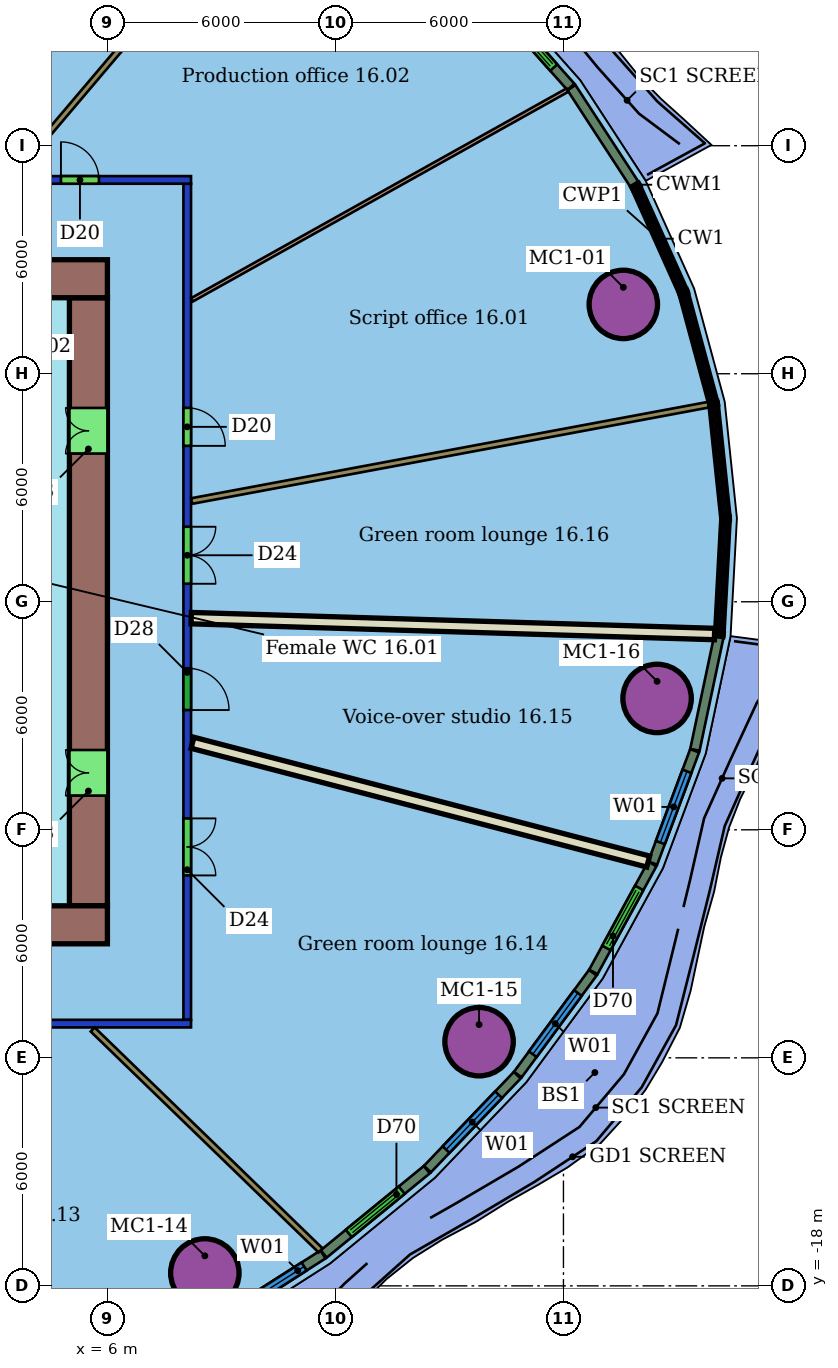
"""IFC4 building model, lengths in metres.
Left out: names, types, materials, properties, quantities, classifications, styles, units other than length and angle.
Written with IfcOpenShell. Run it as: python <this file> out.ifc"""

import sys

from ifc_helpers import new_model, si_unit, direction, frame, frame_2d, origin, origin_2d, place, context, subcontext, project, spatial, rectangle, hollow_circle, extrude, element, fill, save


model = new_model("IFC4")
c1 = context("Model", 3, precision=1e-05, world=origin(), true_north=direction((0.0, 1.0)))
c2 = subcontext(c1, "Body", "Model", "MODEL_VIEW")
j1 = project(units=[si_unit("LENGTHUNIT", "METRE"), si_unit("PLANEANGLEUNIT", "RADIAN")], contexts=[c1])
p1 = place(None, origin())
s1 = spatial("IfcSite", under=j1, at=p1, CompositionType="ELEMENT")
p2 = place(p1, origin())
s2 = spatial("IfcBuilding", under=s1, at=p2, CompositionType="ELEMENT")
p3 = place(p2, frame((0.0, 0.0, 76.7)))
s3 = spatial("IfcBuildingStorey", under=s2, at=p3, CompositionType="ELEMENT", Elevation=76.7)
for number, where, z_axis, x_axis in (
    (1, (19.575, 7.824, 0.0), (0.0, 0.0, 1.0), (1.0, 0.0, 0.0)),
    (2, (8.563, -17.66, 0.0), (0.0, 0.0, 1.0), (1.0, 0.0, 0.0)),
    (3, (15.78, -11.576, 0.0), (0.0, 0.0, 1.0), (1.0, 0.0, 0.0)),
    (4, (20.464, -2.543, 0.0), (0.0, 0.0, 1.0), (1.0, 0.0, 0.0)),
):
    element("IfcColumn", number, at=place(p3, frame(where, z_axis=z_axis, x_axis=x_axis)), inside=s3, PredefinedType="COLUMN", context=c2, shape_type="SweptSolid", body=[
        extrude(hollow_circle(Radius=0.9, WallThickness=0.06, at=origin_2d()), origin(), (0.0, 0.0, 1.0), 3.55),
    ])
p4 = place(p3, frame((8.2, -11.1, 0.0), z_axis=(0.0, 0.0, 1.0), x_axis=(-1.0, 0.0, 0.0)))
e5 = element("IfcWall", 5, at=p4, inside=s3, PredefinedType="PARTITIONING", context=c2, shape_type="SweptSolid", body=[
    extrude(rectangle(XDim=28.4, YDim=0.2, at=frame_2d((14.2, 0.0))), origin(), (0.0, 0.0, 1.0), 2.85),
])
p5 = place(p4, frame((24.977, 0.0, 0.0)))
e6 = element("IfcOpeningElement", 6, at=p5, cuts=e5, PredefinedType="OPENING", context=c2, shape_type="SweptSolid", body=[
    extrude(rectangle(XDim=1.1, YDim=2.1, at=frame_2d((0.55, 1.05))), frame((0.0, 0.11, 0.0), z_axis=(0.0, -1.0, 0.0), x_axis=(1.0, 0.0, 0.0)), (0.0, 0.0, 1.0), 0.22),
])
p6 = place(p4, frame((19.256, 0.0, 0.0)))
e7 = element("IfcOpeningElement", 7, at=p6, cuts=e5, PredefinedType="OPENING", context=c2, shape_type="SweptSolid", body=[
    extrude(rectangle(XDim=1.0, YDim=2.1, at=frame_2d((0.5, 1.05))), frame((0.0, 0.11, 0.0), z_axis=(0.0, -1.0, 0.0), x_axis=(1.0, 0.0, 0.0)), (0.0, 0.0, 1.0), 0.22),
])
p7 = place(p4, frame((15.081, 0.0, 0.0)))
e8 = element("IfcOpeningElement", 8, at=p7, cuts=e5, PredefinedType="OPENING", context=c2, shape_type="SweptSolid", body=[
    extrude(rectangle(XDim=0.9, YDim=2.1, at=frame_2d((0.45, 1.05))), frame((0.0, 0.11, 0.0), z_axis=(0.0, -1.0, 0.0), x_axis=(1.0, 0.0, 0.0)), (0.0, 0.0, 1.0), 0.22),
])
p8 = place(p4, frame((8.472, 0.0, 0.0)))
e9 = element("IfcOpeningElement", 9, at=p8, cuts=e5, PredefinedType="OPENING", context=c2, shape_type="SweptSolid", body=[
    extrude(rectangle(XDim=0.9, YDim=2.1, at=frame_2d((0.45, 1.05))), frame((0.0, 0.11, 0.0), z_axis=(0.0, -1.0, 0.0), x_axis=(1.0, 0.0, 0.0)), (0.0, 0.0, 1.0), 0.22),
])
p9 = place(p3, frame((-20.2, 11.1, 0.0), z_axis=(0.0, 0.0, 1.0), x_axis=(1.0, 0.0, 0.0)))
e10 = element("IfcWall", 10, at=p9, inside=s3, PredefinedType="PARTITIONING", context=c2, shape_type="SweptSolid", body=[
    extrude(rectangle(XDim=28.4, YDim=0.2, at=frame_2d((14.2, 0.0))), origin(), (0.0, 0.0, 1.0), 2.85),
])
p10 = place(p9, frame((24.977, 0.0, 0.0)))
e11 = element("IfcOpeningElement", 11, at=p10, cuts=e10, PredefinedType="OPENING", context=c2, shape_type="SweptSolid", body=[
    extrude(rectangle(XDim=1.0, YDim=2.1, at=frame_2d((0.5, 1.05))), frame((0.0, 0.11, 0.0), z_axis=(0.0, -1.0, 0.0), x_axis=(1.0, 0.0, 0.0)), (0.0, 0.0, 1.0), 0.22),
])
p11 = place(p9, frame((19.076, 0.0, 0.0)))
e12 = element("IfcOpeningElement", 12, at=p11, cuts=e10, PredefinedType="OPENING", context=c2, shape_type="SweptSolid", body=[
    extrude(rectangle(XDim=1.5, YDim=2.1, at=frame_2d((0.75, 1.05))), frame((0.0, 0.11, 0.0), z_axis=(0.0, -1.0, 0.0), x_axis=(1.0, 0.0, 0.0)), (0.0, 0.0, 1.0), 0.22),
])
p12 = place(p9, frame((15.051, 0.0, 0.0)))
e13 = element("IfcOpeningElement", 13, at=p12, cuts=e10, PredefinedType="OPENING", context=c2, shape_type="SweptSolid", body=[
    extrude(rectangle(XDim=0.9, YDim=2.1, at=frame_2d((0.45, 1.05))), frame((0.0, 0.11, 0.0), z_axis=(0.0, -1.0, 0.0), x_axis=(1.0, 0.0, 0.0)), (0.0, 0.0, 1.0), 0.22),
])
p13 = place(p9, frame((8.231, 0.0, 0.0)))
e14 = element("IfcOpeningElement", 14, at=p13, cuts=e10, PredefinedType="OPENING", context=c2, shape_type="SweptSolid", body=[
    extrude(rectangle(XDim=1.2, YDim=2.1, at=frame_2d((0.6, 1.05))), frame((0.0, 0.11, 0.0), z_axis=(0.0, -1.0, 0.0), x_axis=(1.0, 0.0, 0.0)), (0.0, 0.0, 1.0), 0.22),
])
p14 = place(p3, frame((8.1, 11.0, 0.0), z_axis=(0.0, 0.0, 1.0), x_axis=(0.0, -1.0, 0.0)))
e15 = element("IfcWall", 15, at=p14, inside=s3, PredefinedType="PARTITIONING", context=c2, shape_type="SweptSolid", body=[
    extrude(rectangle(XDim=22.0, YDim=0.2, at=frame_2d((11.0, 0.0))), origin(), (0.0, 0.0, 1.0), 2.85),
])
p15 = place(p14, frame((5.898, 0.0, 0.0)))
e16 = element("IfcOpeningElement", 16, at=p15, cuts=e15, PredefinedType="OPENING", context=c2, shape_type="SweptSolid", body=[
    extrude(rectangle(XDim=1.0, YDim=2.1, at=frame_2d((0.5, 1.05))), frame((0.0, 0.11, 0.0), z_axis=(0.0, -1.0, 0.0), x_axis=(1.0, 0.0, 0.0)), (0.0, 0.0, 1.0), 0.22),
])
p16 = place(p14, frame((16.7, 0.0, 0.0)))
e17 = element("IfcOpeningElement", 17, at=p16, cuts=e15, PredefinedType="OPENING", context=c2, shape_type="SweptSolid", body=[
    extrude(rectangle(XDim=1.5, YDim=2.1, at=frame_2d((0.75, 1.05))), frame((0.0, 0.11, 0.0), z_axis=(0.0, -1.0, 0.0), x_axis=(1.0, 0.0, 0.0)), (0.0, 0.0, 1.0), 0.22),
])
p17 = place(p14, frame((12.749, 0.0, 0.0)))
e18 = element("IfcOpeningElement", 18, at=p17, cuts=e15, PredefinedType="OPENING", context=c2, shape_type="SweptSolid", body=[
    extrude(rectangle(XDim=1.1, YDim=2.1, at=frame_2d((0.55, 1.05))), frame((0.0, 0.11, 0.0), z_axis=(0.0, -1.0, 0.0), x_axis=(1.0, 0.0, 0.0)), (0.0, 0.0, 1.0), 0.22),
])
p18 = place(p14, frame((9.026, 0.0, 0.0)))
e19 = element("IfcOpeningElement", 19, at=p18, cuts=e15, PredefinedType="OPENING", context=c2, shape_type="SweptSolid", body=[
    extrude(rectangle(XDim=1.5, YDim=2.1, at=frame_2d((0.75, 1.05))), frame((0.0, 0.11, 0.0), z_axis=(0.0, -1.0, 0.0), x_axis=(1.0, 0.0, 0.0)), (0.0, 0.0, 1.0), 0.22),
])
p19 = place(p3, frame((21.825, 5.187, 0.0), z_axis=(0.0, 0.0, 1.0), x_axis=(-0.983062883459, -0.183268565676, 0.0)))
e20 = element("IfcWall", 20, at=p19, inside=s3, PredefinedType="PARTITIONING", context=c2, shape_type="SweptSolid", body=[
    extrude(rectangle(XDim=13.846, YDim=0.15, at=frame_2d((6.923, 0.0))), origin(), (0.0, 0.0, 1.0), 3.55),
])
p20 = place(p3, frame((18.104, 13.463, 0.0), z_axis=(0.0, 0.0, 1.0), x_axis=(-0.873053971866, -0.4876235866, 0.0)))
e21 = element("IfcWall", 21, at=p20, inside=s3, PredefinedType="PARTITIONING", context=c2, shape_type="SweptSolid", body=[
    extrude(rectangle(XDim=11.317, YDim=0.1, at=frame_2d((5.658, 0.0))), origin(), (0.0, 0.0, 1.0), 3.55),
])
p21 = place(p3, frame((10.716, 19.716, 0.0), z_axis=(0.0, 0.0, 1.0), x_axis=(-0.646692205785, -0.762751067503, 0.0)))
e22 = element("IfcWall", 22, at=p21, inside=s3, PredefinedType="PARTITIONING", context=c2, shape_type="SweptSolid", body=[
    extrude(rectangle(XDim=11.101, YDim=0.15, at=frame_2d((5.55, 0.0))), origin(), (0.0, 0.0, 1.0), 3.55),
])
p22 = place(p3, frame((11.609, -17.066, 0.0), z_axis=(0.0, 0.0, 1.0), x_axis=(-0.71809914042, 0.695940819702, 0.0)))
e23 = element("IfcWall", 23, at=p22, inside=s3, PredefinedType="PARTITIONING", context=c2, shape_type="SweptSolid", body=[
    extrude(rectangle(XDim=8.352, YDim=0.15, at=frame_2d((4.176, 0.0))), origin(), (0.0, 0.0, 1.0), 3.55),
])
p23 = place(p3, frame((20.23, -6.835, 0.0), z_axis=(0.0, 0.0, 1.0), x_axis=(-0.967685437555, 0.252160452774, 0.0)))
e24 = element("IfcWall", 24, at=p23, inside=s3, PredefinedType="PARTITIONING", context=c2, shape_type="SweptSolid", body=[
    extrude(rectangle(XDim=12.393, YDim=0.3, at=frame_2d((6.196, 0.0))), origin(), (0.0, 0.0, 1.0), 3.55),
])
p24 = place(p3, frame((21.976, -0.848, 0.0), z_axis=(0.0, 0.0, 1.0), x_axis=(-0.999540837696, 0.030300392357, 0.0)))
e25 = element("IfcWall", 25, at=p24, inside=s3, PredefinedType="PARTITIONING", context=c2, shape_type="SweptSolid", body=[
    extrude(rectangle(XDim=13.778, YDim=0.3, at=frame_2d((6.889, 0.0))), origin(), (0.0, 0.0, 1.0), 3.55),
])
p25 = place(p3, frame((19.871, 10.978, 0.0), z_axis=(0.0, 0.0, 1.0), x_axis=(-0.545574882471, 0.838062078618, 0.0)))
e26 = element("IfcWall", 26, at=p25, inside=s3, PredefinedType="SOLIDWALL", context=c2, shape_type="SweptSolid", body=[
    extrude(rectangle(XDim=3.042, YDim=0.25, at=frame_2d((1.521, 0.0))), origin(), (0.0, 0.0, 1.0), 3.15),
])
p26 = place(p3, frame((18.195, 13.549, 0.0), z_axis=(0.0, 0.0, 1.0), x_axis=(-0.663940867432, 0.747785079119, 0.0)))
e27 = element("IfcWall", 27, at=p26, inside=s3, PredefinedType="SOLIDWALL", context=c2, shape_type="SweptSolid", body=[
    extrude(rectangle(XDim=3.154, YDim=0.25, at=frame_2d((1.577, 0.0))), origin(), (0.0, 0.0, 1.0), 3.15),
])
p27 = place(p26, frame((0.677, 0.0, 0.0)))
e28 = element("IfcOpeningElement", 28, at=p27, cuts=e27, PredefinedType="OPENING", context=c2, shape_type="SweptSolid", body=[
    extrude(rectangle(XDim=1.8, YDim=2.4, at=frame_2d((0.9, 1.2))), frame((0.0, 0.135, 0.0), z_axis=(0.0, -1.0, 0.0), x_axis=(1.0, 0.0, 0.0)), (0.0, 0.0, 1.0), 0.27),
])
p28 = place(p3, frame((8.657, -19.1, 0.0), z_axis=(0.0, 0.0, 1.0), x_axis=(0.842814889598, 0.538203550594, 0.0)))
e29 = element("IfcWall", 29, at=p28, inside=s3, PredefinedType="SOLIDWALL", context=c2, shape_type="SweptSolid", body=[
    extrude(rectangle(XDim=3.579, YDim=0.25, at=frame_2d((1.789, 0.0))), origin(), (0.0, 0.0, 1.0), 3.15),
])
p29 = place(p28, frame((0.989, 0.0, 0.8)))
e30 = element("IfcOpeningElement", 30, at=p29, cuts=e29, PredefinedType="OPENING", context=c2, shape_type="SweptSolid", body=[
    extrude(rectangle(XDim=2.0, YDim=2.2, at=frame_2d((1.0, 1.1))), frame((0.0, 0.135, 0.0), z_axis=(0.0, -1.0, 0.0), x_axis=(1.0, 0.0, 0.0)), (0.0, 0.0, 1.0), 0.27),
])
p30 = place(p3, frame((11.691, -17.16, 0.0), z_axis=(0.0, 0.0, 1.0), x_axis=(0.774224225452, 0.632911406694, 0.0)))
e31 = element("IfcWall", 31, at=p30, inside=s3, PredefinedType="SOLIDWALL", context=c2, shape_type="SweptSolid", body=[
    extrude(rectangle(XDim=3.504, YDim=0.25, at=frame_2d((1.752, 0.0))), origin(), (0.0, 0.0, 1.0), 3.15),
])
p31 = place(p30, frame((0.852, 0.0, 0.0)))
e32 = element("IfcOpeningElement", 32, at=p31, cuts=e31, PredefinedType="OPENING", context=c2, shape_type="SweptSolid", body=[
    extrude(rectangle(XDim=1.8, YDim=2.4, at=frame_2d((0.9, 1.2))), frame((0.0, 0.135, 0.0), z_axis=(0.0, -1.0, 0.0), x_axis=(1.0, 0.0, 0.0)), (0.0, 0.0, 1.0), 0.27),
])
p32 = place(p3, frame((14.421, -14.927, 0.0), z_axis=(0.0, 0.0, 1.0), x_axis=(0.691365335557, 0.722505344472, 0.0)))
e33 = element("IfcWall", 33, at=p32, inside=s3, PredefinedType="SOLIDWALL", context=c2, shape_type="SweptSolid", body=[
    extrude(rectangle(XDim=3.418, YDim=0.25, at=frame_2d((1.709, 0.0))), origin(), (0.0, 0.0, 1.0), 3.15),
])
p33 = place(p32, frame((0.709, 0.0, 0.8)))
e34 = element("IfcOpeningElement", 34, at=p33, cuts=e33, PredefinedType="OPENING", context=c2, shape_type="SweptSolid", body=[
    extrude(rectangle(XDim=2.0, YDim=2.2, at=frame_2d((1.0, 1.1))), frame((0.0, 0.135, 0.0), z_axis=(0.0, -1.0, 0.0), x_axis=(1.0, 0.0, 0.0)), (0.0, 0.0, 1.0), 0.27),
])
p34 = place(p3, frame((16.8, -12.439, 0.0), z_axis=(0.0, 0.0, 1.0), x_axis=(0.593169002349, 0.805077968058, 0.0)))
e35 = element("IfcWall", 35, at=p34, inside=s3, PredefinedType="SOLIDWALL", context=c2, shape_type="SweptSolid", body=[
    extrude(rectangle(XDim=3.327, YDim=0.25, at=frame_2d((1.664, 0.0))), origin(), (0.0, 0.0, 1.0), 3.15),
])
p35 = place(p34, frame((0.664, 0.0, 0.8)))
e36 = element("IfcOpeningElement", 36, at=p35, cuts=e35, PredefinedType="OPENING", context=c2, shape_type="SweptSolid", body=[
    extrude(rectangle(XDim=2.0, YDim=2.2, at=frame_2d((1.0, 1.1))), frame((0.0, 0.135, 0.0), z_axis=(0.0, -1.0, 0.0), x_axis=(1.0, 0.0, 0.0)), (0.0, 0.0, 1.0), 0.27),
])
p36 = place(p3, frame((18.787, -9.74, 0.0), z_axis=(0.0, 0.0, 1.0), x_axis=(0.479174455818, 0.877719682411, 0.0)))
e37 = element("IfcWall", 37, at=p36, inside=s3, PredefinedType="SOLIDWALL", context=c2, shape_type="SweptSolid", body=[
    extrude(rectangle(XDim=3.237, YDim=0.25, at=frame_2d((1.618, 0.0))), origin(), (0.0, 0.0, 1.0), 3.15),
])
p37 = place(p36, frame((0.718, 0.0, 0.0)))
e38 = element("IfcOpeningElement", 38, at=p37, cuts=e37, PredefinedType="OPENING", context=c2, shape_type="SweptSolid", body=[
    extrude(rectangle(XDim=1.8, YDim=2.4, at=frame_2d((0.9, 1.2))), frame((0.0, 0.135, 0.0), z_axis=(0.0, -1.0, 0.0), x_axis=(1.0, 0.0, 0.0)), (0.0, 0.0, 1.0), 0.27),
])
p38 = place(p3, frame((20.348, -6.875, 0.0), z_axis=(0.0, 0.0, 1.0), x_axis=(0.349935355695, 0.936773850422, 0.0)))
e39 = element("IfcWall", 39, at=p38, inside=s3, PredefinedType="SOLIDWALL", context=c2, shape_type="SweptSolid", body=[
    extrude(rectangle(XDim=3.154, YDim=0.25, at=frame_2d((1.577, 0.0))), origin(), (0.0, 0.0, 1.0), 3.15),
])
p39 = place(p38, frame((0.577, 0.0, 0.8)))
e40 = element("IfcOpeningElement", 40, at=p39, cuts=e39, PredefinedType="OPENING", context=c2, shape_type="SweptSolid", body=[
    extrude(rectangle(XDim=2.0, YDim=2.2, at=frame_2d((1.0, 1.1))), frame((0.0, 0.135, 0.0), z_axis=(0.0, -1.0, 0.0), x_axis=(1.0, 0.0, 0.0)), (0.0, 0.0, 1.0), 0.27),
])
p40 = place(p3, frame((21.459, -3.895, 0.0), z_axis=(0.0, 0.0, 1.0), x_axis=(0.206952682713, 0.97835095294, 0.0)))
e41 = element("IfcWall", 41, at=p40, inside=s3, PredefinedType="SOLIDWALL", context=c2, shape_type="SweptSolid", body=[
    extrude(rectangle(XDim=3.042, YDim=0.25, at=frame_2d((1.521, 0.0))), origin(), (0.0, 0.0, 1.0), 3.15),
])
p41 = place(p3, frame((6.0, 8.5, 0.0), z_axis=(0.0, 0.0, 1.0), x_axis=(-1.0, 0.0, 0.0)))
e42 = element("IfcWall", 42, at=p41, inside=s3, PredefinedType="SHEAR", context=c2, shape_type="SweptSolid", body=[
    extrude(rectangle(XDim=12.0, YDim=1.0, at=frame_2d((6.0, 0.0))), origin(), (0.0, 0.0, 1.0), 3.4),
])
p42 = place(p41, frame((5.6, 0.0, 0.0)))
e43 = element("IfcOpeningElement", 43, at=p42, cuts=e42, PredefinedType="OPENING", context=c2, shape_type="SweptSolid", body=[
    extrude(rectangle(XDim=1.2, YDim=2.1, at=frame_2d((0.6, 1.05))), frame((0.0, 0.51, 0.0), z_axis=(0.0, -1.0, 0.0), x_axis=(1.0, 0.0, 0.0)), (0.0, 0.0, 1.0), 1.02),
])
p43 = place(p3, frame((-18.0, -8.5, 0.0), z_axis=(0.0, 0.0, 1.0), x_axis=(1.0, 0.0, 0.0)))
e44 = element("IfcWall", 44, at=p43, inside=s3, PredefinedType="SHEAR", context=c2, shape_type="SweptSolid", body=[
    extrude(rectangle(XDim=24.0, YDim=1.0, at=frame_2d((12.0, 0.0))), origin(), (0.0, 0.0, 1.0), 3.4),
])
p44 = place(p43, frame((6.0, 0.0, 0.0)))
e45 = element("IfcOpeningElement", 45, at=p44, cuts=e44, PredefinedType="OPENING", context=c2, shape_type="SweptSolid", body=[
    extrude(rectangle(XDim=1.2, YDim=2.1, at=frame_2d((0.6, 1.05))), frame((0.0, 0.51, 0.0), z_axis=(0.0, -1.0, 0.0), x_axis=(1.0, 0.0, 0.0)), (0.0, 0.0, 1.0), 1.02),
])
p45 = place(p3, frame((5.5, -8.0, 0.0), z_axis=(0.0, 0.0, 1.0), x_axis=(0.0, 1.0, 0.0)))
e46 = element("IfcWall", 46, at=p45, inside=s3, PredefinedType="SHEAR", context=c2, shape_type="SweptSolid", body=[
    extrude(rectangle(XDim=16.0, YDim=1.0, at=frame_2d((8.0, 0.0))), origin(), (0.0, 0.0, 1.0), 3.4),
])
p46 = place(p45, frame((2.9, 0.0, 0.0)))
e47 = element("IfcOpeningElement", 47, at=p46, cuts=e46, PredefinedType="OPENING", context=c2, shape_type="SweptSolid", body=[
    extrude(rectangle(XDim=1.2, YDim=2.1, at=frame_2d((0.6, 1.05))), frame((0.0, 0.51, 0.0), z_axis=(0.0, -1.0, 0.0), x_axis=(1.0, 0.0, 0.0)), (0.0, 0.0, 1.0), 1.02),
])
p47 = place(p45, frame((11.9, 0.0, 0.0)))
e48 = element("IfcOpeningElement", 48, at=p47, cuts=e46, PredefinedType="OPENING", context=c2, shape_type="SweptSolid", body=[
    extrude(rectangle(XDim=1.2, YDim=2.1, at=frame_2d((0.6, 1.05))), frame((0.0, 0.51, 0.0), z_axis=(0.0, -1.0, 0.0), x_axis=(1.0, 0.0, 0.0)), (0.0, 0.0, 1.0), 1.02),
])
p48 = place(p15, origin())
e49 = element("IfcDoor", 49, at=p48, inside=s3, OperationType="SINGLE_SWING_RIGHT", PredefinedType="DOOR", context=c2, shape_type="SweptSolid", body=[
    extrude(rectangle(XDim=1.0, YDim=2.1, at=frame_2d((0.5, 1.05))), frame((0.0, 0.025, 0.0), z_axis=(0.0, -1.0, 0.0), x_axis=(1.0, 0.0, 0.0)), (0.0, 0.0, 1.0), 0.05),
])
fill(e16, e49)
p49 = place(p10, origin())
e50 = element("IfcDoor", 50, at=p49, inside=s3, OperationType="SINGLE_SWING_LEFT", PredefinedType="DOOR", context=c2, shape_type="SweptSolid", body=[
    extrude(rectangle(XDim=1.0, YDim=2.1, at=frame_2d((0.5, 1.05))), frame((0.0, 0.025, 0.0), z_axis=(0.0, -1.0, 0.0), x_axis=(1.0, 0.0, 0.0)), (0.0, 0.0, 1.0), 0.05),
])
fill(e11, e50)
p50 = place(p16, origin())
e51 = element("IfcDoor", 51, at=p50, inside=s3, OperationType="DOUBLE_DOOR_SINGLE_SWING", PredefinedType="DOOR", context=c2, shape_type="SweptSolid", body=[
    extrude(rectangle(XDim=1.5, YDim=2.1, at=frame_2d((0.75, 1.05))), frame((0.0, 0.025, 0.0), z_axis=(0.0, -1.0, 0.0), x_axis=(1.0, 0.0, 0.0)), (0.0, 0.0, 1.0), 0.05),
])
fill(e17, e51)
p51 = place(p17, origin())
e52 = element("IfcDoor", 52, at=p51, inside=s3, OperationType="SINGLE_SWING_RIGHT", PredefinedType="DOOR", context=c2, shape_type="SweptSolid", body=[
    extrude(rectangle(XDim=1.1, YDim=2.1, at=frame_2d((0.55, 1.05))), frame((0.0, 0.025, 0.0), z_axis=(0.0, -1.0, 0.0), x_axis=(1.0, 0.0, 0.0)), (0.0, 0.0, 1.0), 0.05),
])
fill(e18, e52)
p52 = place(p18, origin())
e53 = element("IfcDoor", 53, at=p52, inside=s3, OperationType="DOUBLE_DOOR_SINGLE_SWING", PredefinedType="DOOR", context=c2, shape_type="SweptSolid", body=[
    extrude(rectangle(XDim=1.5, YDim=2.1, at=frame_2d((0.75, 1.05))), frame((0.0, 0.025, 0.0), z_axis=(0.0, -1.0, 0.0), x_axis=(1.0, 0.0, 0.0)), (0.0, 0.0, 1.0), 0.05),
])
fill(e19, e53)
p53 = place(p27, origin())
e54 = element("IfcDoor", 54, at=p53, inside=s3, OperationType="DOUBLE_DOOR_SLIDING", PredefinedType="DOOR", context=c2, shape_type="SweptSolid", body=[
    extrude(rectangle(XDim=1.8, YDim=2.4, at=frame_2d((0.9, 1.2))), frame((0.0, 0.025, 0.0), z_axis=(0.0, -1.0, 0.0), x_axis=(1.0, 0.0, 0.0)), (0.0, 0.0, 1.0), 0.05),
])
fill(e28, e54)
p54 = place(p29, origin())
e55 = element("IfcWindow", 55, at=p54, inside=s3, PartitioningType="SINGLE_PANEL", PredefinedType="WINDOW", context=c2, shape_type="SweptSolid", body=[
    extrude(rectangle(XDim=2.0, YDim=2.2, at=frame_2d((1.0, 1.1))), frame((0.0, 0.03, 0.0), z_axis=(0.0, -1.0, 0.0), x_axis=(1.0, 0.0, 0.0)), (0.0, 0.0, 1.0), 0.06),
])
fill(e30, e55)
p55 = place(p31, origin())
e56 = element("IfcDoor", 56, at=p55, inside=s3, OperationType="DOUBLE_DOOR_SLIDING", PredefinedType="DOOR", context=c2, shape_type="SweptSolid", body=[
    extrude(rectangle(XDim=1.8, YDim=2.4, at=frame_2d((0.9, 1.2))), frame((0.0, 0.025, 0.0), z_axis=(0.0, -1.0, 0.0), x_axis=(1.0, 0.0, 0.0)), (0.0, 0.0, 1.0), 0.05),
])
fill(e32, e56)
p56 = place(p33, origin())
e57 = element("IfcWindow", 57, at=p56, inside=s3, PartitioningType="SINGLE_PANEL", PredefinedType="WINDOW", context=c2, shape_type="SweptSolid", body=[
    extrude(rectangle(XDim=2.0, YDim=2.2, at=frame_2d((1.0, 1.1))), frame((0.0, 0.03, 0.0), z_axis=(0.0, -1.0, 0.0), x_axis=(1.0, 0.0, 0.0)), (0.0, 0.0, 1.0), 0.06),
])
fill(e34, e57)
p57 = place(p35, origin())
e58 = element("IfcWindow", 58, at=p57, inside=s3, PartitioningType="SINGLE_PANEL", PredefinedType="WINDOW", context=c2, shape_type="SweptSolid", body=[
    extrude(rectangle(XDim=2.0, YDim=2.2, at=frame_2d((1.0, 1.1))), frame((0.0, 0.03, 0.0), z_axis=(0.0, -1.0, 0.0), x_axis=(1.0, 0.0, 0.0)), (0.0, 0.0, 1.0), 0.06),
])
fill(e36, e58)
p58 = place(p37, origin())
e59 = element("IfcDoor", 59, at=p58, inside=s3, OperationType="DOUBLE_DOOR_SLIDING", PredefinedType="DOOR", context=c2, shape_type="SweptSolid", body=[
    extrude(rectangle(XDim=1.8, YDim=2.4, at=frame_2d((0.9, 1.2))), frame((0.0, 0.025, 0.0), z_axis=(0.0, -1.0, 0.0), x_axis=(1.0, 0.0, 0.0)), (0.0, 0.0, 1.0), 0.05),
])
fill(e38, e59)
p59 = place(p39, origin())
e60 = element("IfcWindow", 60, at=p59, inside=s3, PartitioningType="SINGLE_PANEL", PredefinedType="WINDOW", context=c2, shape_type="SweptSolid", body=[
    extrude(rectangle(XDim=2.0, YDim=2.2, at=frame_2d((1.0, 1.1))), frame((0.0, 0.03, 0.0), z_axis=(0.0, -1.0, 0.0), x_axis=(1.0, 0.0, 0.0)), (0.0, 0.0, 1.0), 0.06),
])
fill(e40, e60)
p60 = place(p46, origin())
e61 = element("IfcDoor", 61, at=p60, inside=s3, OperationType="DOUBLE_DOOR_SINGLE_SWING", PredefinedType="NOTDEFINED", context=c2, shape_type="SweptSolid", body=[
    extrude(rectangle(XDim=1.2, YDim=2.1, at=frame_2d((0.6, 1.05))), frame((0.0, 0.025, 0.0), z_axis=(0.0, -1.0, 0.0), x_axis=(1.0, 0.0, 0.0)), (0.0, 0.0, 1.0), 0.05),
])
fill(e47, e61)
p61 = place(p47, origin())
e62 = element("IfcDoor", 62, at=p61, inside=s3, OperationType="DOUBLE_DOOR_SINGLE_SWING", PredefinedType="NOTDEFINED", context=c2, shape_type="SweptSolid", body=[
    extrude(rectangle(XDim=1.2, YDim=2.1, at=frame_2d((0.6, 1.05))), frame((0.0, 0.025, 0.0), z_axis=(0.0, -1.0, 0.0), x_axis=(1.0, 0.0, 0.0)), (0.0, 0.0, 1.0), 0.05),
])
fill(e48, e62)
save(model, sys.argv[1])
